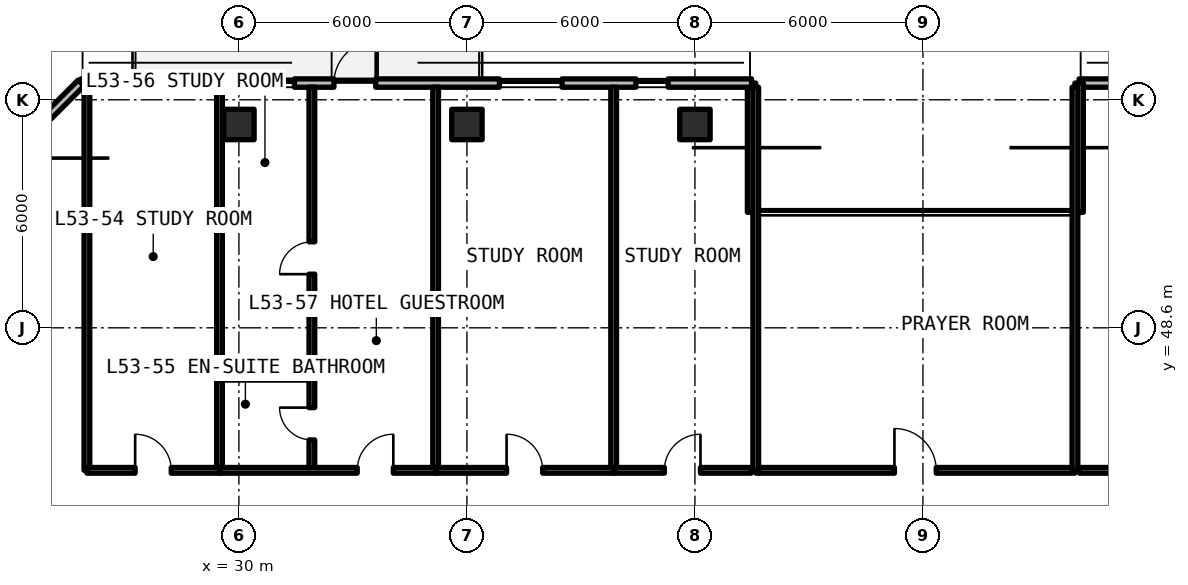
"""IFC4 building model, lengths in metres.
Left out: names, types, materials, properties, quantities, classifications, styles, units other than length and angle.
Written with IfcOpenShell. Run it as: python <this file> out.ifc"""

import sys

from ifc_helpers import new_model, si_unit, direction, frame, frame_2d, origin, origin_2d, place, context, subcontext, project, spatial, rectangle, extrude, element, fill, save


model = new_model("IFC4")
c1 = context("Model", 3, precision=1e-05, world=origin(), true_north=direction((0.0, 1.0)))
c2 = subcontext(c1, "Body", "Model", "MODEL_VIEW")
j1 = project(units=[si_unit("LENGTHUNIT", "METRE"), si_unit("PLANEANGLEUNIT", "RADIAN")], contexts=[c1])
p1 = place(None, origin())
s1 = spatial("IfcSite", under=j1, at=p1, CompositionType="ELEMENT")
p2 = place(p1, origin())
s2 = spatial("IfcBuilding", under=s1, at=p2, CompositionType="ELEMENT")
p3 = place(p2, frame((0.0, 0.0, 191.73)))
s3 = spatial("IfcBuildingStorey", under=s2, at=p3, CompositionType="ELEMENT", Elevation=191.73)
for number, where, z_axis, x_axis in (
    (1, (30.0, 53.95, 0.0), (0.0, 0.0, 1.0), (1.0, 0.0, 0.0)),
    (2, (36.0, 53.95, 0.0), (0.0, 0.0, 1.0), (1.0, 0.0, 0.0)),
    (3, (42.0, 53.95, 0.0), (0.0, 0.0, 1.0), (1.0, 0.0, 0.0)),
):
    element("IfcColumn", number, at=place(p3, frame(where, z_axis=z_axis, x_axis=x_axis)), inside=s3, PredefinedType="COLUMN", context=c2, shape_type="SweptSolid", body=[
        extrude(rectangle(XDim=0.8, YDim=0.8, at=origin_2d()), origin(), (0.0, 0.0, 1.0), 3.3),
    ])
p4 = place(p3, frame((95.354, 55.04, 0.0), z_axis=(0.0, 0.0, 1.0), x_axis=(-1.0, 0.0, 0.0)))
e4 = element("IfcWall", 4, at=p4, inside=s3, PredefinedType="SOLIDWALL", context=c2, shape_type="SweptSolid", body=[
    extrude(rectangle(XDim=43.244, YDim=0.22, at=frame_2d((21.622, 0.0))), origin(), (0.0, 0.0, 1.0), 3.08),
])
p5 = place(p4, frame((25.704, 0.0, 0.0)))
e5 = element("IfcOpeningElement", 5, at=p5, cuts=e4, PredefinedType="OPENING", context=c2, shape_type="SweptSolid", body=[
    extrude(rectangle(XDim=1.1, YDim=2.15, at=frame_2d((0.55, 1.075))), frame((0.0, 0.12, 0.0), z_axis=(0.0, -1.0, 0.0), x_axis=(1.0, 0.0, 0.0)), (0.0, 0.0, 1.0), 0.24),
])
p6 = place(p4, frame((19.104, 0.0, 0.0)))
e6 = element("IfcOpeningElement", 6, at=p6, cuts=e4, PredefinedType="OPENING", context=c2, shape_type="SweptSolid", body=[
    extrude(rectangle(XDim=1.1, YDim=2.15, at=frame_2d((0.55, 1.075))), frame((0.0, 0.12, 0.0), z_axis=(0.0, -1.0, 0.0), x_axis=(1.0, 0.0, 0.0)), (0.0, 0.0, 1.0), 0.24),
])
p7 = place(p4, frame((36.749, 0.0, 0.78)))
e7 = element("IfcOpeningElement", 7, at=p7, cuts=e4, PredefinedType="OPENING", context=c2, shape_type="SweptSolid", body=[
    extrude(rectangle(XDim=1.65, YDim=1.66, at=frame_2d((0.825, 0.83))), frame((0.0, 0.12, 0.0), z_axis=(0.0, -1.0, 0.0), x_axis=(1.0, 0.0, 0.0)), (0.0, 0.0, 1.0), 0.24),
])
p8 = place(p4, frame((30.199, 0.0, 0.78)))
e8 = element("IfcOpeningElement", 8, at=p8, cuts=e4, PredefinedType="OPENING", context=c2, shape_type="SweptSolid", body=[
    extrude(rectangle(XDim=0.85, YDim=1.65, at=frame_2d((0.425, 0.825))), frame((0.0, 0.12, 0.0), z_axis=(0.0, -1.0, 0.0), x_axis=(1.0, 0.0, 0.0)), (0.0, 0.0, 1.0), 0.24),
])
p9 = place(p4, frame((8.918, 0.0, 0.78)))
e9 = element("IfcOpeningElement", 9, at=p9, cuts=e4, PredefinedType="OPENING", context=c2, shape_type="SweptSolid", body=[
    extrude(rectangle(XDim=1.65, YDim=1.66, at=frame_2d((0.825, 0.83))), frame((0.0, 0.12, 0.0), z_axis=(0.0, -1.0, 0.0), x_axis=(1.0, 0.0, 0.0)), (0.0, 0.0, 1.0), 0.24),
])
p10 = place(p4, frame((2.66, 0.0, 0.78)))
e10 = element("IfcOpeningElement", 10, at=p10, cuts=e4, PredefinedType="OPENING", context=c2, shape_type="SweptSolid", body=[
    extrude(rectangle(XDim=1.65, YDim=1.66, at=frame_2d((0.825, 0.83))), frame((0.0, 0.12, 0.0), z_axis=(0.0, -1.0, 0.0), x_axis=(1.0, 0.0, 0.0)), (0.0, 0.0, 1.0), 0.24),
])
for number, where, z_axis, x_axis in (
    (11, (52.11, 55.04, 0.0), (0.0, 0.0, 1.0), (0.0, -1.0, 0.0)),
    (12, (43.49, 51.64, 0.0), (0.0, 0.0, 1.0), (0.0, 1.0, 0.0)),
):
    element("IfcWall", number, at=place(p3, frame(where, z_axis=z_axis, x_axis=x_axis)), inside=s3, PredefinedType="SOLIDWALL", context=c2, shape_type="SweptSolid", body=[
        extrude(rectangle(XDim=3.4, YDim=0.22, at=frame_2d((1.7, 0.0))), origin(), (0.0, 0.0, 1.0), 3.08),
    ])
p11 = place(p3, frame((43.49, 55.04, 0.0), z_axis=(0.0, 0.0, 1.0), x_axis=(-1.0, 0.0, 0.0)))
e13 = element("IfcWall", 13, at=p11, inside=s3, PredefinedType="SOLIDWALL", context=c2, shape_type="SweptSolid", body=[
    extrude(rectangle(XDim=17.644, YDim=0.22, at=frame_2d((8.822, 0.0))), origin(), (0.0, 0.0, 1.0), 3.08),
])
p12 = place(p11, frame((9.89, 0.0, 0.0)))
e14 = element("IfcOpeningElement", 14, at=p12, cuts=e13, PredefinedType="OPENING", context=c2, shape_type="SweptSolid", body=[
    extrude(rectangle(XDim=1.1, YDim=2.15, at=frame_2d((0.55, 1.075))), frame((0.0, 0.12, 0.0), z_axis=(0.0, -1.0, 0.0), x_axis=(1.0, 0.0, 0.0)), (0.0, 0.0, 1.0), 0.24),
])
p13 = place(p11, frame((14.92, 0.0, 0.78)))
e15 = element("IfcOpeningElement", 15, at=p13, cuts=e13, PredefinedType="OPENING", context=c2, shape_type="SweptSolid", body=[
    extrude(rectangle(XDim=1.65, YDim=1.66, at=frame_2d((0.825, 0.83))), frame((0.0, 0.12, 0.0), z_axis=(0.0, -1.0, 0.0), x_axis=(1.0, 0.0, 0.0)), (0.0, 0.0, 1.0), 0.24),
])
p14 = place(p11, frame((12.03, 0.0, 0.78)))
e16 = element("IfcOpeningElement", 16, at=p14, cuts=e13, PredefinedType="OPENING", context=c2, shape_type="SweptSolid", body=[
    extrude(rectangle(XDim=0.85, YDim=1.65, at=frame_2d((0.425, 0.825))), frame((0.0, 0.12, 0.0), z_axis=(0.0, -1.0, 0.0), x_axis=(1.0, 0.0, 0.0)), (0.0, 0.0, 1.0), 0.24),
])
p15 = place(p11, frame((4.986, 0.0, 0.78)))
e17 = element("IfcOpeningElement", 17, at=p15, cuts=e13, PredefinedType="OPENING", context=c2, shape_type="SweptSolid", body=[
    extrude(rectangle(XDim=1.65, YDim=1.66, at=frame_2d((0.825, 0.83))), frame((0.0, 0.12, 0.0), z_axis=(0.0, -1.0, 0.0), x_axis=(1.0, 0.0, 0.0)), (0.0, 0.0, 1.0), 0.24),
])
p16 = place(p11, frame((2.194, 0.0, 0.78)))
e18 = element("IfcOpeningElement", 18, at=p16, cuts=e13, PredefinedType="OPENING", context=c2, shape_type="SweptSolid", body=[
    extrude(rectangle(XDim=0.85, YDim=1.65, at=frame_2d((0.425, 0.825))), frame((0.0, 0.12, 0.0), z_axis=(0.0, -1.0, 0.0), x_axis=(1.0, 0.0, 0.0)), (0.0, 0.0, 1.0), 0.24),
])
p17 = place(p3, frame((25.846, 55.04, 0.0), z_axis=(0.0, 0.0, 1.0), x_axis=(-0.707106781187, -0.707106781187, 0.0)))
e19 = element("IfcWall", 19, at=p17, inside=s3, PredefinedType="SOLIDWALL", context=c2, shape_type="SweptSolid", body=[
    extrude(rectangle(XDim=5.849, YDim=0.22, at=frame_2d((2.924, 0.0))), origin(), (0.0, 0.0, 1.0), 3.08),
])
p18 = place(p17, frame((1.224, 0.0, 0.78)))
e20 = element("IfcOpeningElement", 20, at=p18, cuts=e19, PredefinedType="OPENING", context=c2, shape_type="SweptSolid", body=[
    extrude(rectangle(XDim=3.4, YDim=1.66, at=frame_2d((1.7, 0.83))), frame((0.0, 0.12, 0.0), z_axis=(0.0, -1.0, 0.0), x_axis=(1.0, 0.0, 0.0)), (0.0, 0.0, 1.0), 0.24),
])
p19 = place(p3, frame((43.6, 44.85, 0.0), z_axis=(0.0, 0.0, 1.0), x_axis=(1.0, 0.0, 0.0)))
e21 = element("IfcWall", 21, at=p19, inside=s3, PredefinedType="SOLIDWALL", context=c2, shape_type="SweptSolid", body=[
    extrude(rectangle(XDim=8.4, YDim=0.15, at=frame_2d((4.2, 0.0))), origin(), (0.0, 0.0, 1.0), 2.35),
])
p20 = place(p19, frame((3.65, 0.0, 0.0)))
e22 = element("IfcOpeningElement", 22, at=p20, cuts=e21, PredefinedType="OPENING", context=c2, shape_type="SweptSolid", body=[
    extrude(rectangle(XDim=1.1, YDim=2.15, at=frame_2d((0.55, 1.075))), frame((0.0, 0.085, 0.0), z_axis=(0.0, -1.0, 0.0), x_axis=(1.0, 0.0, 0.0)), (0.0, 0.0, 1.0), 0.17),
])
for number, where, z_axis, x_axis in (
    (23, (43.6, 44.85, 0.0), (0.0, 0.0, 1.0), (0.0, 1.0, 0.0)),
    (24, (52.0, 44.85, 0.0), (0.0, 0.0, 1.0), (0.0, 1.0, 0.0)),
    (25, (26.0, 44.85, 0.0), (0.0, 0.0, 1.0), (0.0, 1.0, 0.0)),
    (26, (29.49, 44.85, 0.0), (0.0, 0.0, 1.0), (0.0, 1.0, 0.0)),
):
    element("IfcWall", number, at=place(p3, frame(where, z_axis=z_axis, x_axis=x_axis)), inside=s3, PredefinedType="SOLIDWALL", context=c2, shape_type="SweptSolid", body=[
        extrude(rectangle(XDim=10.08, YDim=0.15, at=frame_2d((5.04, 0.0))), origin(), (0.0, 0.0, 1.0), 2.35),
    ])
p21 = place(p3, frame((26.0, 44.85, 0.0), z_axis=(0.0, 0.0, 1.0), x_axis=(1.0, 0.0, 0.0)))
e27 = element("IfcWall", 27, at=p21, inside=s3, PredefinedType="SOLIDWALL", context=c2, shape_type="SweptSolid", body=[
    extrude(rectangle(XDim=3.49, YDim=0.15, at=frame_2d((1.745, 0.0))), origin(), (0.0, 0.0, 1.0), 2.35),
])
p22 = place(p21, frame((1.27, 0.0, 0.0)))
e28 = element("IfcOpeningElement", 28, at=p22, cuts=e27, PredefinedType="OPENING", context=c2, shape_type="SweptSolid", body=[
    extrude(rectangle(XDim=0.95, YDim=2.15, at=frame_2d((0.475, 1.075))), frame((0.0, 0.085, 0.0), z_axis=(0.0, -1.0, 0.0), x_axis=(1.0, 0.0, 0.0)), (0.0, 0.0, 1.0), 0.17),
])
p23 = place(p3, frame((35.176, 44.85, 0.0), z_axis=(0.0, 0.0, 1.0), x_axis=(0.0, 1.0, 0.0)))
e29 = element("IfcWall", 29, at=p23, inside=s3, PredefinedType="SOLIDWALL", context=c2, shape_type="SweptSolid", body=[
    extrude(rectangle(XDim=10.08, YDim=0.15, at=frame_2d((5.04, 0.0))), origin(), (0.0, 0.0, 1.0), 2.35),
])
p24 = place(p3, frame((29.49, 47.3, 0.0), z_axis=(0.0, 0.0, 1.0), x_axis=(1.0, 0.0, 0.0)))
e30 = element("IfcWall", 30, at=p24, inside=s3, PredefinedType="PARTITIONING", context=c2, shape_type="SweptSolid", body=[
    extrude(rectangle(XDim=2.43, YDim=0.15, at=frame_2d((1.215, 0.0))), origin(), (0.0, 0.0, 1.0), 2.35),
])
p25 = place(p3, frame((31.92, 44.85, 0.0), z_axis=(0.0, 0.0, 1.0), x_axis=(0.0, 1.0, 0.0)))
e31 = element("IfcWall", 31, at=p25, inside=s3, PredefinedType="PARTITIONING", context=c2, shape_type="SweptSolid", body=[
    extrude(rectangle(XDim=10.08, YDim=0.15, at=frame_2d((5.04, 0.0))), origin(), (0.0, 0.0, 1.0), 2.35),
])
p26 = place(p25, frame((0.8, 0.0, 0.0)))
e32 = element("IfcOpeningElement", 32, at=p26, cuts=e31, PredefinedType="OPENING", context=c2, shape_type="SweptSolid", body=[
    extrude(rectangle(XDim=0.85, YDim=2.1, at=frame_2d((0.425, 1.05))), frame((0.0, 0.085, 0.0), z_axis=(0.0, -1.0, 0.0), x_axis=(1.0, 0.0, 0.0)), (0.0, 0.0, 1.0), 0.17),
])
p27 = place(p25, frame((5.162, 0.0, 0.0)))
e33 = element("IfcOpeningElement", 33, at=p27, cuts=e31, PredefinedType="OPENING", context=c2, shape_type="SweptSolid", body=[
    extrude(rectangle(XDim=0.85, YDim=2.1, at=frame_2d((0.425, 1.05))), frame((0.0, 0.085, 0.0), z_axis=(0.0, -1.0, 0.0), x_axis=(1.0, 0.0, 0.0)), (0.0, 0.0, 1.0), 0.17),
])
p28 = place(p3, frame((29.49, 44.85, 0.0), z_axis=(0.0, 0.0, 1.0), x_axis=(1.0, 0.0, 0.0)))
e34 = element("IfcWall", 34, at=p28, inside=s3, PredefinedType="SOLIDWALL", context=c2, shape_type="SweptSolid", body=[
    extrude(rectangle(XDim=5.687, YDim=0.15, at=frame_2d((2.843, 0.0))), origin(), (0.0, 0.0, 1.0), 2.35),
])
p29 = place(p28, frame((3.624, 0.0, 0.0)))
e35 = element("IfcOpeningElement", 35, at=p29, cuts=e34, PredefinedType="OPENING", context=c2, shape_type="SweptSolid", body=[
    extrude(rectangle(XDim=0.95, YDim=2.15, at=frame_2d((0.475, 1.075))), frame((0.0, 0.085, 0.0), z_axis=(0.0, -1.0, 0.0), x_axis=(1.0, 0.0, 0.0)), (0.0, 0.0, 1.0), 0.17),
])
p30 = place(p3, frame((39.861, 44.85, 0.0), z_axis=(0.0, 0.0, 1.0), x_axis=(0.0, 1.0, 0.0)))
e36 = element("IfcWall", 36, at=p30, inside=s3, PredefinedType="SOLIDWALL", context=c2, shape_type="SweptSolid", body=[
    extrude(rectangle(XDim=10.08, YDim=0.15, at=frame_2d((5.04, 0.0))), origin(), (0.0, 0.0, 1.0), 2.35),
])
p31 = place(p3, frame((35.176, 44.85, 0.0), z_axis=(0.0, 0.0, 1.0), x_axis=(1.0, 0.0, 0.0)))
e37 = element("IfcWall", 37, at=p31, inside=s3, PredefinedType="SOLIDWALL", context=c2, shape_type="SweptSolid", body=[
    extrude(rectangle(XDim=4.685, YDim=0.15, at=frame_2d((2.342, 0.0))), origin(), (0.0, 0.0, 1.0), 2.35),
])
p32 = place(p31, frame((1.867, 0.0, 0.0)))
e38 = element("IfcOpeningElement", 38, at=p32, cuts=e37, PredefinedType="OPENING", context=c2, shape_type="SweptSolid", body=[
    extrude(rectangle(XDim=0.95, YDim=2.15, at=frame_2d((0.475, 1.075))), frame((0.0, 0.085, 0.0), z_axis=(0.0, -1.0, 0.0), x_axis=(1.0, 0.0, 0.0)), (0.0, 0.0, 1.0), 0.17),
])
p33 = place(p3, frame((39.861, 44.85, 0.0), z_axis=(0.0, 0.0, 1.0), x_axis=(1.0, 0.0, 0.0)))
e39 = element("IfcWall", 39, at=p33, inside=s3, PredefinedType="SOLIDWALL", context=c2, shape_type="SweptSolid", body=[
    extrude(rectangle(XDim=3.619, YDim=0.15, at=frame_2d((1.81, 0.0))), origin(), (0.0, 0.0, 1.0), 2.35),
])
p34 = place(p33, frame((1.334, 0.0, 0.0)))
e40 = element("IfcOpeningElement", 40, at=p34, cuts=e39, PredefinedType="OPENING", context=c2, shape_type="SweptSolid", body=[
    extrude(rectangle(XDim=0.95, YDim=2.15, at=frame_2d((0.475, 1.075))), frame((0.0, 0.085, 0.0), z_axis=(0.0, -1.0, 0.0), x_axis=(1.0, 0.0, 0.0)), (0.0, 0.0, 1.0), 0.17),
])
p35 = place(p3, frame((52.12, 44.85, 0.0), z_axis=(0.0, 0.0, 1.0), x_axis=(1.0, 0.0, 0.0)))
e41 = element("IfcWall", 41, at=p35, inside=s3, PredefinedType="SOLIDWALL", context=c2, shape_type="SweptSolid", body=[
    extrude(rectangle(XDim=11.32, YDim=0.15, at=frame_2d((5.66, 0.0))), origin(), (0.0, 0.0, 1.0), 2.35),
])
p36 = place(p35, frame((5.11, 0.0, 0.0)))
e42 = element("IfcOpeningElement", 42, at=p36, cuts=e41, PredefinedType="OPENING", context=c2, shape_type="SweptSolid", body=[
    extrude(rectangle(XDim=1.1, YDim=2.15, at=frame_2d((0.55, 1.075))), frame((0.0, 0.085, 0.0), z_axis=(0.0, -1.0, 0.0), x_axis=(1.0, 0.0, 0.0)), (0.0, 0.0, 1.0), 0.17),
])
p37 = place(p12, frame((1.1, 0.0, 0.0), z_axis=(0.0, 0.0, 1.0), x_axis=(-1.0, 0.0, 0.0)))
e43 = element("IfcDoor", 43, at=p37, inside=s3, OperationType="SINGLE_SWING_RIGHT", PredefinedType="DOOR", context=c2, shape_type="SweptSolid", body=[
    extrude(rectangle(XDim=1.1, YDim=2.15, at=frame_2d((0.55, 1.075))), frame((0.0, 0.025, 0.0), z_axis=(0.0, -1.0, 0.0), x_axis=(1.0, 0.0, 0.0)), (0.0, 0.0, 1.0), 0.05),
])
fill(e14, e43)
p38 = place(p13, origin())
e44 = element("IfcWindow", 44, at=p38, inside=s3, PartitioningType="SINGLE_PANEL", PredefinedType="WINDOW", context=c2, shape_type="SweptSolid", body=[
    extrude(rectangle(XDim=1.65, YDim=1.66, at=frame_2d((0.825, 0.83))), frame((0.0, 0.03, 0.0), z_axis=(0.0, -1.0, 0.0), x_axis=(1.0, 0.0, 0.0)), (0.0, 0.0, 1.0), 0.06),
])
fill(e15, e44)
p39 = place(p14, origin())
e45 = element("IfcWindow", 45, at=p39, inside=s3, PartitioningType="SINGLE_PANEL", PredefinedType="WINDOW", context=c2, shape_type="SweptSolid", body=[
    extrude(rectangle(XDim=0.85, YDim=1.65, at=frame_2d((0.425, 0.825))), frame((0.0, 0.03, 0.0), z_axis=(0.0, -1.0, 0.0), x_axis=(1.0, 0.0, 0.0)), (0.0, 0.0, 1.0), 0.06),
])
fill(e16, e45)
p40 = place(p15, origin())
e46 = element("IfcWindow", 46, at=p40, inside=s3, PartitioningType="SINGLE_PANEL", PredefinedType="WINDOW", context=c2, shape_type="SweptSolid", body=[
    extrude(rectangle(XDim=1.65, YDim=1.66, at=frame_2d((0.825, 0.83))), frame((0.0, 0.03, 0.0), z_axis=(0.0, -1.0, 0.0), x_axis=(1.0, 0.0, 0.0)), (0.0, 0.0, 1.0), 0.06),
])
fill(e17, e46)
p41 = place(p16, origin())
e47 = element("IfcWindow", 47, at=p41, inside=s3, PartitioningType="SINGLE_PANEL", PredefinedType="WINDOW", context=c2, shape_type="SweptSolid", body=[
    extrude(rectangle(XDim=0.85, YDim=1.65, at=frame_2d((0.425, 0.825))), frame((0.0, 0.03, 0.0), z_axis=(0.0, -1.0, 0.0), x_axis=(1.0, 0.0, 0.0)), (0.0, 0.0, 1.0), 0.06),
])
fill(e18, e47)
p42 = place(p20, origin())
e48 = element("IfcDoor", 48, at=p42, inside=s3, OperationType="SINGLE_SWING_LEFT", PredefinedType="DOOR", context=c2, shape_type="SweptSolid", body=[
    extrude(rectangle(XDim=1.1, YDim=2.15, at=frame_2d((0.55, 1.075))), frame((0.0, 0.025, 0.0), z_axis=(0.0, -1.0, 0.0), x_axis=(1.0, 0.0, 0.0)), (0.0, 0.0, 1.0), 0.05),
])
fill(e22, e48)
p43 = place(p22, origin())
e49 = element("IfcDoor", 49, at=p43, inside=s3, OperationType="SINGLE_SWING_LEFT", PredefinedType="DOOR", context=c2, shape_type="SweptSolid", body=[
    extrude(rectangle(XDim=0.95, YDim=2.15, at=frame_2d((0.475, 1.075))), frame((0.0, 0.025, 0.0), z_axis=(0.0, -1.0, 0.0), x_axis=(1.0, 0.0, 0.0)), (0.0, 0.0, 1.0), 0.05),
])
fill(e28, e49)
p44 = place(p26, origin())
e50 = element("IfcDoor", 50, at=p44, inside=s3, OperationType="SINGLE_SWING_RIGHT", PredefinedType="DOOR", context=c2, shape_type="SweptSolid", body=[
    extrude(rectangle(XDim=0.85, YDim=2.1, at=frame_2d((0.425, 1.05))), frame((0.0, 0.025, 0.0), z_axis=(0.0, -1.0, 0.0), x_axis=(1.0, 0.0, 0.0)), (0.0, 0.0, 1.0), 0.05),
])
fill(e32, e50)
p45 = place(p27, origin())
e51 = element("IfcDoor", 51, at=p45, inside=s3, OperationType="SINGLE_SWING_LEFT", PredefinedType="DOOR", context=c2, shape_type="SweptSolid", body=[
    extrude(rectangle(XDim=0.85, YDim=2.1, at=frame_2d((0.425, 1.05))), frame((0.0, 0.025, 0.0), z_axis=(0.0, -1.0, 0.0), x_axis=(1.0, 0.0, 0.0)), (0.0, 0.0, 1.0), 0.05),
])
fill(e33, e51)
p46 = place(p29, origin())
e52 = element("IfcDoor", 52, at=p46, inside=s3, OperationType="SINGLE_SWING_RIGHT", PredefinedType="DOOR", context=c2, shape_type="SweptSolid", body=[
    extrude(rectangle(XDim=0.95, YDim=2.15, at=frame_2d((0.475, 1.075))), frame((0.0, 0.025, 0.0), z_axis=(0.0, -1.0, 0.0), x_axis=(1.0, 0.0, 0.0)), (0.0, 0.0, 1.0), 0.05),
])
fill(e35, e52)
p47 = place(p32, origin())
e53 = element("IfcDoor", 53, at=p47, inside=s3, OperationType="SINGLE_SWING_LEFT", PredefinedType="DOOR", context=c2, shape_type="SweptSolid", body=[
    extrude(rectangle(XDim=0.95, YDim=2.15, at=frame_2d((0.475, 1.075))), frame((0.0, 0.025, 0.0), z_axis=(0.0, -1.0, 0.0), x_axis=(1.0, 0.0, 0.0)), (0.0, 0.0, 1.0), 0.05),
])
fill(e38, e53)
p48 = place(p34, origin())
e54 = element("IfcDoor", 54, at=p48, inside=s3, OperationType="SINGLE_SWING_RIGHT", PredefinedType="DOOR", context=c2, shape_type="SweptSolid", body=[
    extrude(rectangle(XDim=0.95, YDim=2.15, at=frame_2d((0.475, 1.075))), frame((0.0, 0.025, 0.0), z_axis=(0.0, -1.0, 0.0), x_axis=(1.0, 0.0, 0.0)), (0.0, 0.0, 1.0), 0.05),
])
fill(e40, e54)
save(model, sys.argv[1])
